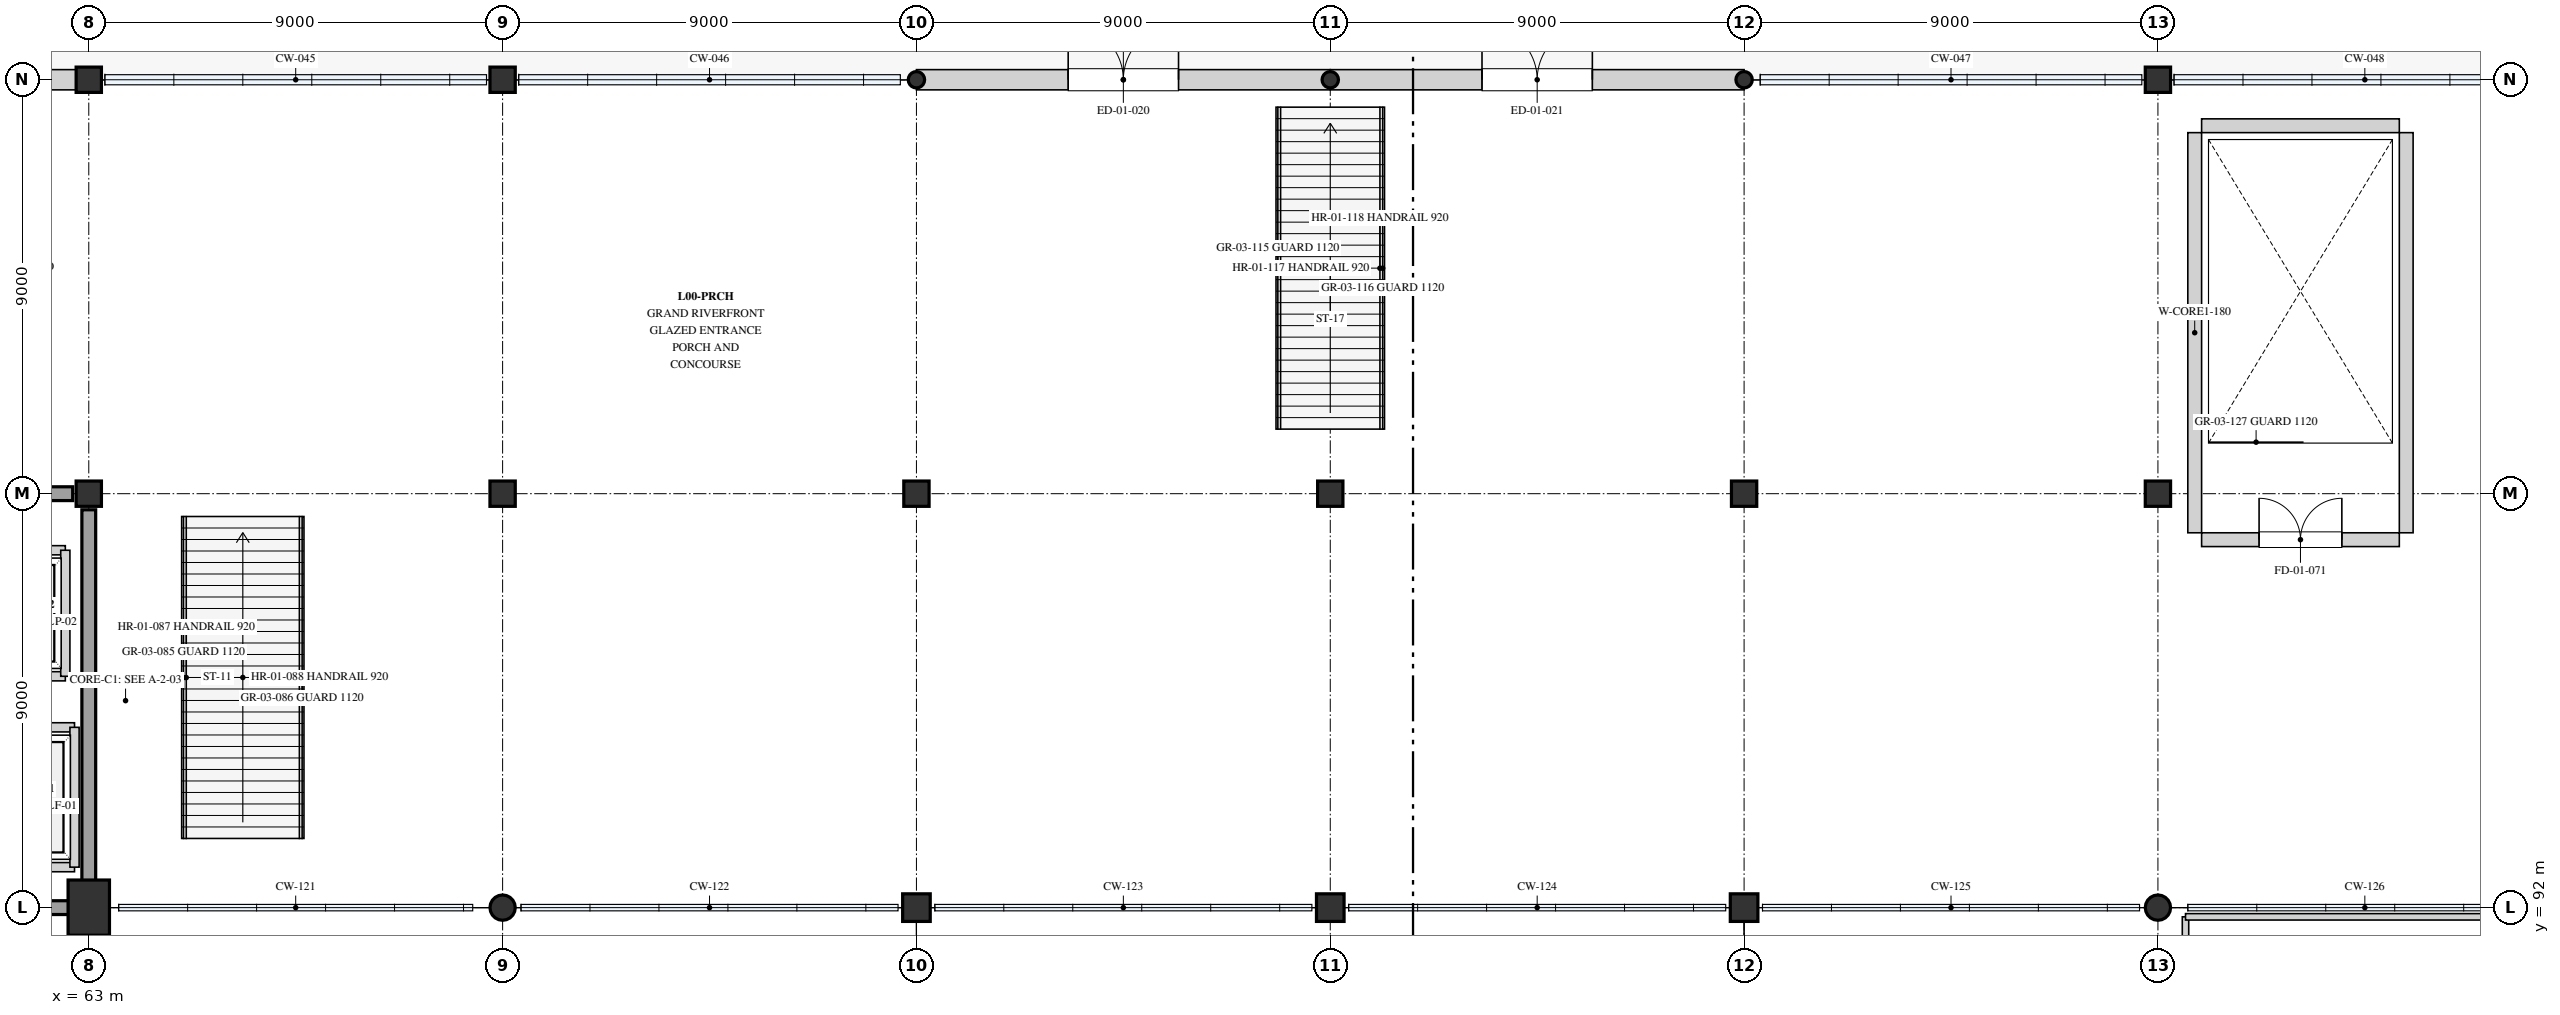
"""IFC4 building model, lengths in metres.
Left out: names, types, materials, properties, quantities, classifications, styles, units other than length and angle.
Written with IfcOpenShell. Run it as: python <this file> out.ifc"""

import sys

from ifc_helpers import new_model, si_unit, direction, frame, frame_2d, origin, origin_2d, place, context, subcontext, project, spatial, rectangle, circle, hollow_circle, extrude, element, fill, save


model = new_model("IFC4")
c1 = context("Model", 3, precision=1e-05, world=origin(), true_north=direction((0.0, 1.0)))
c2 = subcontext(c1, "Body", "Model", "MODEL_VIEW")
j1 = project(units=[si_unit("LENGTHUNIT", "METRE"), si_unit("PLANEANGLEUNIT", "RADIAN")], contexts=[c1])
p1 = place(None, origin())
s1 = spatial("IfcSite", under=j1, at=p1, CompositionType="ELEMENT")
p2 = place(p1, origin())
s2 = spatial("IfcBuilding", under=s1, at=p2, CompositionType="ELEMENT")
p3 = place(p2, origin())
s3 = spatial("IfcBuildingStorey", under=s2, at=p3, CompositionType="ELEMENT", Elevation=0.0)
p4 = place(p3, frame((63.0, 92.0, 0.0), z_axis=(0.0, 0.0, 1.0), x_axis=(1.0, 0.0, 0.0)))
e1 = element("IfcColumn", 1, at=p4, inside=s3, PredefinedType="COLUMN", context=c2, shape_type="SweptSolid", body=[
    extrude(rectangle(XDim=0.9, YDim=1.2, at=origin_2d()), origin(), (0.0, 0.0, 1.0), 4.5),
])
for number, where, z_axis, x_axis in (
    (2, (63.0, 101.0, 0.0), (0.0, 0.0, 1.0), (1.0, 0.0, 0.0)),
    (3, (63.0, 110.0, 0.0), (0.0, 0.0, 1.0), (1.0, 0.0, 0.0)),
):
    element("IfcColumn", number, at=place(p3, frame(where, z_axis=z_axis, x_axis=x_axis)), inside=s3, PredefinedType="COLUMN", context=c2, shape_type="SweptSolid", body=[
        extrude(rectangle(XDim=0.55, YDim=0.55, at=origin_2d()), origin(), (0.0, 0.0, 1.0), 4.5),
    ])
p5 = place(p3, frame((72.0, 92.0, 0.0), z_axis=(0.0, 0.0, 1.0), x_axis=(1.0, 0.0, 0.0)))
e4 = element("IfcColumn", 4, at=p5, inside=s3, PredefinedType="COLUMN", context=c2, shape_type="SweptSolid", body=[
    extrude(circle(Radius=0.275, at=origin_2d()), origin(), (0.0, 0.0, 1.0), 4.5),
])
for number, where, z_axis, x_axis in (
    (5, (72.0, 101.0, 0.0), (0.0, 0.0, 1.0), (1.0, 0.0, 0.0)),
    (6, (72.0, 110.0, 0.0), (0.0, 0.0, 1.0), (1.0, 0.0, 0.0)),
):
    element("IfcColumn", number, at=place(p3, frame(where, z_axis=z_axis, x_axis=x_axis)), inside=s3, PredefinedType="COLUMN", context=c2, shape_type="SweptSolid", body=[
        extrude(rectangle(XDim=0.55, YDim=0.55, at=origin_2d()), origin(), (0.0, 0.0, 1.0), 4.5),
    ])
p6 = place(p3, frame((81.0, 92.0, 0.0), z_axis=(0.0, 0.0, 1.0), x_axis=(1.0, 0.0, 0.0)))
e7 = element("IfcColumn", 7, at=p6, inside=s3, PredefinedType="COLUMN", context=c2, shape_type="SweptSolid", body=[
    extrude(rectangle(XDim=0.6, YDim=0.6, at=origin_2d()), origin(), (0.0, 0.0, 1.0), 4.5),
])
p7 = place(p3, frame((81.0, 101.0, 0.0), z_axis=(0.0, 0.0, 1.0), x_axis=(1.0, 0.0, 0.0)))
e8 = element("IfcColumn", 8, at=p7, inside=s3, PredefinedType="COLUMN", context=c2, shape_type="SweptSolid", body=[
    extrude(rectangle(XDim=0.55, YDim=0.55, at=origin_2d()), origin(), (0.0, 0.0, 1.0), 4.5),
])
p8 = place(p3, frame((81.0, 110.0, 0.0), z_axis=(0.0, 0.0, 1.0), x_axis=(1.0, 0.0, 0.0)))
e9 = element("IfcColumn", 9, at=p8, inside=s3, PredefinedType="PILASTER", context=c2, shape_type="SweptSolid", body=[
    extrude(hollow_circle(Radius=0.178, WallThickness=0.014, at=origin_2d()), origin(), (0.0, 0.0, 1.0), 4.5),
])
p9 = place(p3, frame((90.0, 92.0, 0.0), z_axis=(0.0, 0.0, 1.0), x_axis=(1.0, 0.0, 0.0)))
e10 = element("IfcColumn", 10, at=p9, inside=s3, PredefinedType="COLUMN", context=c2, shape_type="SweptSolid", body=[
    extrude(rectangle(XDim=0.6, YDim=0.6, at=origin_2d()), origin(), (0.0, 0.0, 1.0), 4.5),
])
p10 = place(p3, frame((90.0, 101.0, 0.0), z_axis=(0.0, 0.0, 1.0), x_axis=(1.0, 0.0, 0.0)))
e11 = element("IfcColumn", 11, at=p10, inside=s3, PredefinedType="COLUMN", context=c2, shape_type="SweptSolid", body=[
    extrude(rectangle(XDim=0.55, YDim=0.55, at=origin_2d()), origin(), (0.0, 0.0, 1.0), 4.5),
])
p11 = place(p3, frame((90.0, 110.0, 0.0), z_axis=(0.0, 0.0, 1.0), x_axis=(1.0, 0.0, 0.0)))
e12 = element("IfcColumn", 12, at=p11, inside=s3, PredefinedType="PILASTER", context=c2, shape_type="SweptSolid", body=[
    extrude(hollow_circle(Radius=0.178, WallThickness=0.014, at=origin_2d()), origin(), (0.0, 0.0, 1.0), 4.5),
])
p12 = place(p3, frame((99.0, 92.0, 0.0), z_axis=(0.0, 0.0, 1.0), x_axis=(1.0, 0.0, 0.0)))
e13 = element("IfcColumn", 13, at=p12, inside=s3, PredefinedType="COLUMN", context=c2, shape_type="SweptSolid", body=[
    extrude(rectangle(XDim=0.6, YDim=0.6, at=origin_2d()), origin(), (0.0, 0.0, 1.0), 4.5),
])
p13 = place(p3, frame((99.0, 101.0, 0.0), z_axis=(0.0, 0.0, 1.0), x_axis=(1.0, 0.0, 0.0)))
e14 = element("IfcColumn", 14, at=p13, inside=s3, PredefinedType="COLUMN", context=c2, shape_type="SweptSolid", body=[
    extrude(rectangle(XDim=0.55, YDim=0.55, at=origin_2d()), origin(), (0.0, 0.0, 1.0), 4.5),
])
p14 = place(p3, frame((99.0, 110.0, 0.0), z_axis=(0.0, 0.0, 1.0), x_axis=(1.0, 0.0, 0.0)))
e15 = element("IfcColumn", 15, at=p14, inside=s3, PredefinedType="PILASTER", context=c2, shape_type="SweptSolid", body=[
    extrude(hollow_circle(Radius=0.178, WallThickness=0.014, at=origin_2d()), origin(), (0.0, 0.0, 1.0), 4.5),
])
p15 = place(p3, frame((108.0, 92.0, 0.0), z_axis=(0.0, 0.0, 1.0), x_axis=(1.0, 0.0, 0.0)))
e16 = element("IfcColumn", 16, at=p15, inside=s3, PredefinedType="COLUMN", context=c2, shape_type="SweptSolid", body=[
    extrude(circle(Radius=0.275, at=origin_2d()), origin(), (0.0, 0.0, 1.0), 4.5),
])
for number, where, z_axis, x_axis in (
    (17, (108.0, 101.0, 0.0), (0.0, 0.0, 1.0), (1.0, 0.0, 0.0)),
    (18, (108.0, 110.0, 0.0), (0.0, 0.0, 1.0), (1.0, 0.0, 0.0)),
):
    element("IfcColumn", number, at=place(p3, frame(where, z_axis=z_axis, x_axis=x_axis)), inside=s3, PredefinedType="COLUMN", context=c2, shape_type="SweptSolid", body=[
        extrude(rectangle(XDim=0.55, YDim=0.55, at=origin_2d()), origin(), (0.0, 0.0, 1.0), 4.5),
    ])
p16 = place(p3, frame((54.8, 110.0, 0.0), z_axis=(0.0, 0.0, 1.0), x_axis=(1.0, 0.0, 0.0)))
e19 = element("IfcWall", 19, at=p16, inside=s3, PredefinedType="STANDARD", context=c2, shape_type="SweptSolid", body=[
    extrude(rectangle(XDim=8.2, YDim=0.44, at=frame_2d((4.1, 0.0))), origin(), (0.0, 0.0, 1.0), 3.52),
])
p17 = place(p16, frame((2.9, 0.0, 0.0)))
e20 = element("IfcOpeningElement", 20, at=p17, cuts=e19, PredefinedType="OPENING", context=c2, shape_type="SweptSolid", body=[
    extrude(rectangle(XDim=2.4, YDim=2.6, at=frame_2d((1.2, 1.3))), frame((0.0, 0.23, 0.0), z_axis=(0.0, -1.0, 0.0), x_axis=(1.0, 0.0, 0.0)), (0.0, 0.0, 1.0), 0.46),
])
p18 = place(p3, frame((81.0, 110.0, 0.0), z_axis=(0.0, 0.0, 1.0), x_axis=(1.0, 0.0, 0.0)))
e21 = element("IfcWall", 21, at=p18, inside=s3, PredefinedType="STANDARD", context=c2, shape_type="SweptSolid", body=[
    extrude(rectangle(XDim=9.0, YDim=0.44, at=frame_2d((4.5, 0.0))), origin(), (0.0, 0.0, 1.0), 3.52),
])
p19 = place(p18, frame((3.3, 0.0, 0.0)))
e22 = element("IfcOpeningElement", 22, at=p19, cuts=e21, PredefinedType="OPENING", context=c2, shape_type="SweptSolid", body=[
    extrude(rectangle(XDim=2.4, YDim=2.6, at=frame_2d((1.2, 1.3))), frame((0.0, 0.23, 0.0), z_axis=(0.0, -1.0, 0.0), x_axis=(1.0, 0.0, 0.0)), (0.0, 0.0, 1.0), 0.46),
])
p20 = place(p3, frame((90.0, 110.0, 0.0), z_axis=(0.0, 0.0, 1.0), x_axis=(1.0, 0.0, 0.0)))
e23 = element("IfcWall", 23, at=p20, inside=s3, PredefinedType="STANDARD", context=c2, shape_type="SweptSolid", body=[
    extrude(rectangle(XDim=9.0, YDim=0.44, at=frame_2d((4.5, 0.0))), origin(), (0.0, 0.0, 1.0), 3.52),
])
p21 = place(p20, frame((3.3, 0.0, 0.0)))
e24 = element("IfcOpeningElement", 24, at=p21, cuts=e23, PredefinedType="OPENING", context=c2, shape_type="SweptSolid", body=[
    extrude(rectangle(XDim=2.4, YDim=2.6, at=frame_2d((1.2, 1.3))), frame((0.0, 0.23, 0.0), z_axis=(0.0, -1.0, 0.0), x_axis=(1.0, 0.0, 0.0)), (0.0, 0.0, 1.0), 0.46),
])
p22 = place(p3, frame((63.0, 92.35, 0.0), z_axis=(0.0, 0.0, 1.0), x_axis=(0.0, 1.0, 0.0)))
e25 = element("IfcWall", 25, at=p22, inside=s3, PredefinedType="SHEAR", context=c2, shape_type="SweptSolid", body=[
    extrude(rectangle(XDim=8.3, YDim=0.3, at=frame_2d((4.15, 0.0))), origin(), (0.0, 0.0, 1.0), 4.22),
])
p23 = place(p3, frame((55.15, 92.0, 0.0), z_axis=(0.0, 0.0, 1.0), x_axis=(1.0, 0.0, 0.0)))
e26 = element("IfcWall", 26, at=p23, inside=s3, PredefinedType="SHEAR", context=c2, shape_type="SweptSolid", body=[
    extrude(rectangle(XDim=7.5, YDim=0.3, at=frame_2d((3.75, 0.0))), origin(), (0.0, 0.0, 1.0), 4.22),
])
p24 = place(p23, frame((4.9, 0.0, 0.0)))
e27 = element("IfcOpeningElement", 27, at=p24, cuts=e26, PredefinedType="OPENING", context=c2, shape_type="SweptSolid", body=[
    extrude(rectangle(XDim=1.1, YDim=2.1, at=frame_2d((0.55, 1.05))), frame((0.0, 0.16, 0.0), z_axis=(0.0, -1.0, 0.0), x_axis=(1.0, 0.0, 0.0)), (0.0, 0.0, 1.0), 0.32),
])
p25 = place(p3, frame((55.15, 101.0, 0.0), z_axis=(0.0, 0.0, 1.0), x_axis=(1.0, 0.0, 0.0)))
e28 = element("IfcWall", 28, at=p25, inside=s3, PredefinedType="SHEAR", context=c2, shape_type="SweptSolid", body=[
    extrude(rectangle(XDim=7.5, YDim=0.3, at=frame_2d((3.75, 0.0))), origin(), (0.0, 0.0, 1.0), 4.22),
])
p26 = place(p25, frame((4.8, 0.0, 0.0)))
e29 = element("IfcOpeningElement", 29, at=p26, cuts=e28, PredefinedType="OPENING", context=c2, shape_type="SweptSolid", body=[
    extrude(rectangle(XDim=1.8, YDim=2.2, at=frame_2d((0.9, 1.1))), frame((0.0, 0.16, 0.0), z_axis=(0.0, -1.0, 0.0), x_axis=(1.0, 0.0, 0.0)), (0.0, 0.0, 1.0), 0.32),
])
for number, where, z_axis, x_axis in (
    (30, (60.21, 92.88, 0.0), (0.0, 0.0, 1.0), (1.0, 0.0, 0.0)),
    (31, (60.21, 95.92, 0.0), (0.0, 0.0, 1.0), (1.0, 0.0, 0.0)),
):
    element("IfcWall", number, at=place(p3, frame(where, z_axis=z_axis, x_axis=x_axis)), inside=s3, PredefinedType="SOLIDWALL", context=c2, shape_type="SweptSolid", body=[
        extrude(rectangle(XDim=2.48, YDim=0.2, at=frame_2d((1.24, 0.0))), origin(), (0.0, 0.0, 1.0), 3.2),
    ])
p27 = place(p3, frame((62.69, 92.88, 0.0), z_axis=(0.0, 0.0, 1.0), x_axis=(0.0, 1.0, 0.0)))
e32 = element("IfcWall", 32, at=p27, inside=s3, PredefinedType="SOLIDWALL", context=c2, shape_type="SweptSolid", body=[
    extrude(rectangle(XDim=3.04, YDim=0.2, at=frame_2d((1.52, 0.0))), origin(), (0.0, 0.0, 1.0), 3.2),
])
for number, where, z_axis, x_axis in (
    (33, (60.41, 97.03, 0.0), (0.0, 0.0, 1.0), (1.0, 0.0, 0.0)),
    (34, (60.41, 99.77, 0.0), (0.0, 0.0, 1.0), (1.0, 0.0, 0.0)),
):
    element("IfcWall", number, at=place(p3, frame(where, z_axis=z_axis, x_axis=x_axis)), inside=s3, PredefinedType="SOLIDWALL", context=c2, shape_type="SweptSolid", body=[
        extrude(rectangle(XDim=2.08, YDim=0.2, at=frame_2d((1.04, 0.0))), origin(), (0.0, 0.0, 1.0), 3.2),
    ])
p28 = place(p3, frame((62.49, 97.03, 0.0), z_axis=(0.0, 0.0, 1.0), x_axis=(0.0, 1.0, 0.0)))
e35 = element("IfcWall", 35, at=p28, inside=s3, PredefinedType="SOLIDWALL", context=c2, shape_type="SweptSolid", body=[
    extrude(rectangle(XDim=2.74, YDim=0.2, at=frame_2d((1.37, 0.0))), origin(), (0.0, 0.0, 1.0), 3.2),
])
for number, where, z_axis, x_axis in (
    (36, (108.8, 100.15, 0.0), (0.0, 0.0, 1.0), (0.0, 1.0, 0.0)),
    (37, (113.4, 100.15, 0.0), (0.0, 0.0, 1.0), (0.0, 1.0, 0.0)),
):
    element("IfcWall", number, at=place(p3, frame(where, z_axis=z_axis, x_axis=x_axis)), inside=s3, PredefinedType="SHEAR", context=c2, shape_type="SweptSolid", body=[
        extrude(rectangle(XDim=8.7, YDim=0.3, at=frame_2d((4.35, 0.0))), origin(), (0.0, 0.0, 1.0), 3.2),
    ])
p29 = place(p3, frame((108.95, 100.0, 0.0), z_axis=(0.0, 0.0, 1.0), x_axis=(1.0, 0.0, 0.0)))
e38 = element("IfcWall", 38, at=p29, inside=s3, PredefinedType="SHEAR", context=c2, shape_type="SweptSolid", body=[
    extrude(rectangle(XDim=4.3, YDim=0.3, at=frame_2d((2.15, 0.0))), origin(), (0.0, 0.0, 1.0), 3.2),
])
p30 = place(p29, frame((1.25, 0.0, 0.0)))
e39 = element("IfcOpeningElement", 39, at=p30, cuts=e38, PredefinedType="OPENING", context=c2, shape_type="SweptSolid", body=[
    extrude(rectangle(XDim=1.8, YDim=2.2, at=frame_2d((0.9, 1.1))), frame((0.0, 0.16, 0.0), z_axis=(0.0, -1.0, 0.0), x_axis=(1.0, 0.0, 0.0)), (0.0, 0.0, 1.0), 0.32),
])
p31 = place(p3, frame((108.95, 109.0, 0.0), z_axis=(0.0, 0.0, 1.0), x_axis=(1.0, 0.0, 0.0)))
e40 = element("IfcWall", 40, at=p31, inside=s3, PredefinedType="SHEAR", context=c2, shape_type="SweptSolid", body=[
    extrude(rectangle(XDim=4.3, YDim=0.3, at=frame_2d((2.15, 0.0))), origin(), (0.0, 0.0, 1.0), 3.2),
])
p32 = place(p3, frame((108.6, 80.2, 0.0), z_axis=(0.0, 0.0, 1.0), x_axis=(0.0, 1.0, 0.0)))
e41 = element("IfcWall", 41, at=p32, inside=s3, PredefinedType="PARTITIONING", context=c2, shape_type="SweptSolid", body=[
    extrude(rectangle(XDim=11.6, YDim=0.14, at=frame_2d((5.8, 0.0))), origin(), (0.0, 0.0, 1.0), 3.2),
])
p33 = place(p3, frame((108.6, 91.8, 0.0), z_axis=(0.0, 0.0, 1.0), x_axis=(1.0, 0.0, 0.0)))
e42 = element("IfcWall", 42, at=p33, inside=s3, PredefinedType="PARTITIONING", context=c2, shape_type="SweptSolid", body=[
    extrude(rectangle(XDim=16.25, YDim=0.14, at=frame_2d((8.125, 0.0))), origin(), (0.0, 0.0, 1.0), 3.2),
])
p34 = place(p19, origin())
e43 = element("IfcDoor", 43, at=p34, inside=s3, OperationType="DOUBLE_DOOR_SINGLE_SWING", PredefinedType="DOOR", context=c2, shape_type="SweptSolid", body=[
    extrude(rectangle(XDim=2.4, YDim=2.6, at=frame_2d((1.2, 1.3))), frame((0.0, 0.025, 0.0), z_axis=(0.0, -1.0, 0.0), x_axis=(1.0, 0.0, 0.0)), (0.0, 0.0, 1.0), 0.05),
])
fill(e22, e43)
p35 = place(p21, origin())
e44 = element("IfcDoor", 44, at=p35, inside=s3, OperationType="DOUBLE_DOOR_SINGLE_SWING", PredefinedType="DOOR", context=c2, shape_type="SweptSolid", body=[
    extrude(rectangle(XDim=2.4, YDim=2.6, at=frame_2d((1.2, 1.3))), frame((0.0, 0.025, 0.0), z_axis=(0.0, -1.0, 0.0), x_axis=(1.0, 0.0, 0.0)), (0.0, 0.0, 1.0), 0.05),
])
fill(e24, e44)
p36 = place(p30, origin())
e45 = element("IfcDoor", 45, at=p36, inside=s3, OperationType="DOUBLE_DOOR_SINGLE_SWING", PredefinedType="DOOR", context=c2, shape_type="SweptSolid", body=[
    extrude(rectangle(XDim=1.8, YDim=2.2, at=frame_2d((0.9, 1.1))), frame((0.0, 0.025, 0.0), z_axis=(0.0, -1.0, 0.0), x_axis=(1.0, 0.0, 0.0)), (0.0, 0.0, 1.0), 0.05),
])
fill(e39, e45)
save(model, sys.argv[1])
